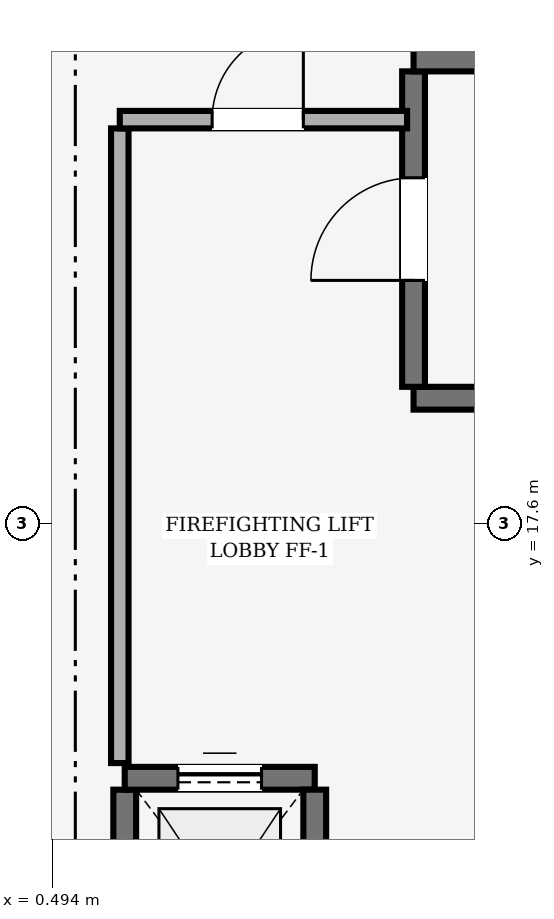
"""IFC4 building model, lengths in metres.
Left out: names, types, materials, properties, quantities, classifications, styles, units other than length and angle.
Written with IfcOpenShell. Run it as: python <this file> out.ifc"""

import sys

from ifc_helpers import new_model, si_unit, direction, frame, frame_2d, origin, place, context, subcontext, project, spatial, rectangle, extrude, element, fill, save


model = new_model("IFC4")
c1 = context("Model", 3, precision=1e-05, world=origin(), true_north=direction((0.0, 1.0)))
c2 = subcontext(c1, "Body", "Model", "MODEL_VIEW")
j1 = project(units=[si_unit("LENGTHUNIT", "METRE"), si_unit("PLANEANGLEUNIT", "RADIAN")], contexts=[c1])
p1 = place(None, origin())
s1 = spatial("IfcSite", under=j1, at=p1, CompositionType="ELEMENT")
p2 = place(p1, origin())
s2 = spatial("IfcBuilding", under=s1, at=p2, CompositionType="ELEMENT")
p3 = place(p2, frame((0.0, 0.0, 22.35)))
s3 = spatial("IfcBuildingStorey", under=s2, at=p3, CompositionType="ELEMENT", Elevation=22.35)
p4 = place(p3, frame((15.43, 19.25, 0.0), z_axis=(0.0, 0.0, 1.0), x_axis=(-1.0, 0.0, 0.0)))
e1 = element("IfcWall", 1, at=p4, inside=s3, PredefinedType="SHEAR", context=c2, shape_type="SweptSolid", body=[
    extrude(rectangle(XDim=10.18, YDim=0.3, at=frame_2d((5.09, 0.0))), origin(), (0.0, 0.0, 1.0), 2.91),
])
p5 = place(p3, frame((5.25, 19.4, 0.0), z_axis=(0.0, 0.0, 1.0), x_axis=(0.0, 1.0, 0.0)))
e2 = element("IfcWall", 2, at=p5, inside=s3, PredefinedType="SHEAR", context=c2, shape_type="SweptSolid", body=[
    extrude(rectangle(XDim=4.15, YDim=0.3, at=frame_2d((2.075, 0.0))), origin(), (0.0, 0.0, 1.0), 2.91),
])
p6 = place(p5, frame((1.4, 0.0, 0.0)))
e3 = element("IfcOpeningElement", 3, at=p6, cuts=e2, PredefinedType="OPENING", context=c2, shape_type="SweptSolid", body=[
    extrude(rectangle(XDim=1.35, YDim=2.2, at=frame_2d((0.675, 1.1))), frame((0.0, 0.15, 0.0), z_axis=(0.0, -1.0, 0.0), x_axis=(1.0, 0.0, 0.0)), (0.0, 0.0, 1.0), 0.3),
])
p7 = place(p3, frame((5.25, 23.7, 0.0), z_axis=(0.0, 0.0, 1.0), x_axis=(1.0, 0.0, 0.0)))
e4 = element("IfcWall", 4, at=p7, inside=s3, PredefinedType="SHEAR", context=c2, shape_type="SweptSolid", body=[
    extrude(rectangle(XDim=10.18, YDim=0.3, at=frame_2d((5.09, 0.0))), origin(), (0.0, 0.0, 1.0), 2.91),
])
p8 = place(p3, frame((1.45, 11.2, 0.0), z_axis=(0.0, 0.0, 1.0), x_axis=(0.0, 1.0, 0.0)))
e5 = element("IfcWall", 5, at=p8, inside=s3, PredefinedType="SHEAR", context=c2, shape_type="SweptSolid", body=[
    extrude(rectangle(XDim=2.9, YDim=0.3, at=frame_2d((1.45, 0.0))), origin(), (0.0, 0.0, 1.0), 2.91),
])
p9 = place(p3, frame((1.45, 14.25, 0.0), z_axis=(0.0, 0.0, 1.0), x_axis=(1.0, 0.0, 0.0)))
e6 = element("IfcWall", 6, at=p9, inside=s3, PredefinedType="SHEAR", context=c2, shape_type="SweptSolid", body=[
    extrude(rectangle(XDim=2.5, YDim=0.3, at=frame_2d((1.25, 0.0))), origin(), (0.0, 0.0, 1.0), 2.91),
])
p10 = place(p9, frame((0.7, 0.0, 0.0)))
e7 = element("IfcOpeningElement", 7, at=p10, cuts=e6, PredefinedType="OPENING", context=c2, shape_type="SweptSolid", body=[
    extrude(rectangle(XDim=1.1, YDim=2.1, at=frame_2d((0.55, 1.05))), frame((0.0, 0.15, 0.0), z_axis=(0.0, -1.0, 0.0), x_axis=(1.0, 0.0, 0.0)), (0.0, 0.0, 1.0), 0.3),
])
p11 = place(p3, frame((3.95, 14.1, 0.0), z_axis=(0.0, 0.0, 1.0), x_axis=(0.0, -1.0, 0.0)))
e8 = element("IfcWall", 8, at=p11, inside=s3, PredefinedType="SHEAR", context=c2, shape_type="SweptSolid", body=[
    extrude(rectangle(XDim=2.9, YDim=0.3, at=frame_2d((1.45, 0.0))), origin(), (0.0, 0.0, 1.0), 2.91),
])
p12 = place(p3, frame((1.385, 14.45, 0.0), z_axis=(0.0, 0.0, 1.0), x_axis=(0.0, 1.0, 0.0)))
e9 = element("IfcWall", 9, at=p12, inside=s3, PredefinedType="PARTITIONING", context=c2, shape_type="SweptSolid", body=[
    extrude(rectangle(XDim=8.35, YDim=0.23, at=frame_2d((4.175, 0.0))), origin(), (0.0, 0.0, 1.0), 2.89),
])
p13 = place(p3, frame((1.385, 22.915, 0.0), z_axis=(0.0, 0.0, 1.0), x_axis=(1.0, 0.0, 0.0)))
e10 = element("IfcWall", 10, at=p13, inside=s3, PredefinedType="PARTITIONING", context=c2, shape_type="SweptSolid", body=[
    extrude(rectangle(XDim=3.78, YDim=0.23, at=frame_2d((1.89, 0.0))), origin(), (0.0, 0.0, 1.0), 2.89),
])
p14 = place(p13, frame((1.215, 0.0, 0.0)))
e11 = element("IfcOpeningElement", 11, at=p14, cuts=e10, PredefinedType="OPENING", context=c2, shape_type="SweptSolid", body=[
    extrude(rectangle(XDim=1.2, YDim=2.15, at=frame_2d((0.6, 1.075))), frame((0.0, 0.115, 0.0), z_axis=(0.0, -1.0, 0.0), x_axis=(1.0, 0.0, 0.0)), (0.0, 0.0, 1.0), 0.23),
])
p15 = place(p6, origin())
e12 = element("IfcDoor", 12, at=p15, inside=s3, OperationType="SINGLE_SWING_LEFT", PredefinedType="DOOR", context=c2, shape_type="SweptSolid", body=[
    extrude(rectangle(XDim=1.35, YDim=2.2, at=frame_2d((0.675, 1.1))), frame((0.0, 0.025, 0.0), z_axis=(0.0, -1.0, 0.0), x_axis=(1.0, 0.0, 0.0)), (0.0, 0.0, 1.0), 0.05),
])
fill(e3, e12)
p16 = place(p10, origin())
e13 = element("IfcDoor", 13, at=p16, inside=s3, OperationType="SLIDING_TO_LEFT", PredefinedType="DOOR", context=c2, shape_type="SweptSolid", body=[
    extrude(rectangle(XDim=1.1, YDim=2.1, at=frame_2d((0.55, 1.05))), frame((0.0, 0.025, 0.0), z_axis=(0.0, -1.0, 0.0), x_axis=(1.0, 0.0, 0.0)), (0.0, 0.0, 1.0), 0.05),
])
fill(e7, e13)
p17 = place(p14, origin())
e14 = element("IfcDoor", 14, at=p17, inside=s3, OperationType="SINGLE_SWING_RIGHT", PredefinedType="DOOR", context=c2, shape_type="SweptSolid", body=[
    extrude(rectangle(XDim=1.2, YDim=2.15, at=frame_2d((0.6, 1.075))), frame((0.0, 0.025, 0.0), z_axis=(0.0, -1.0, 0.0), x_axis=(1.0, 0.0, 0.0)), (0.0, 0.0, 1.0), 0.05),
])
fill(e11, e14)
save(model, sys.argv[1])
